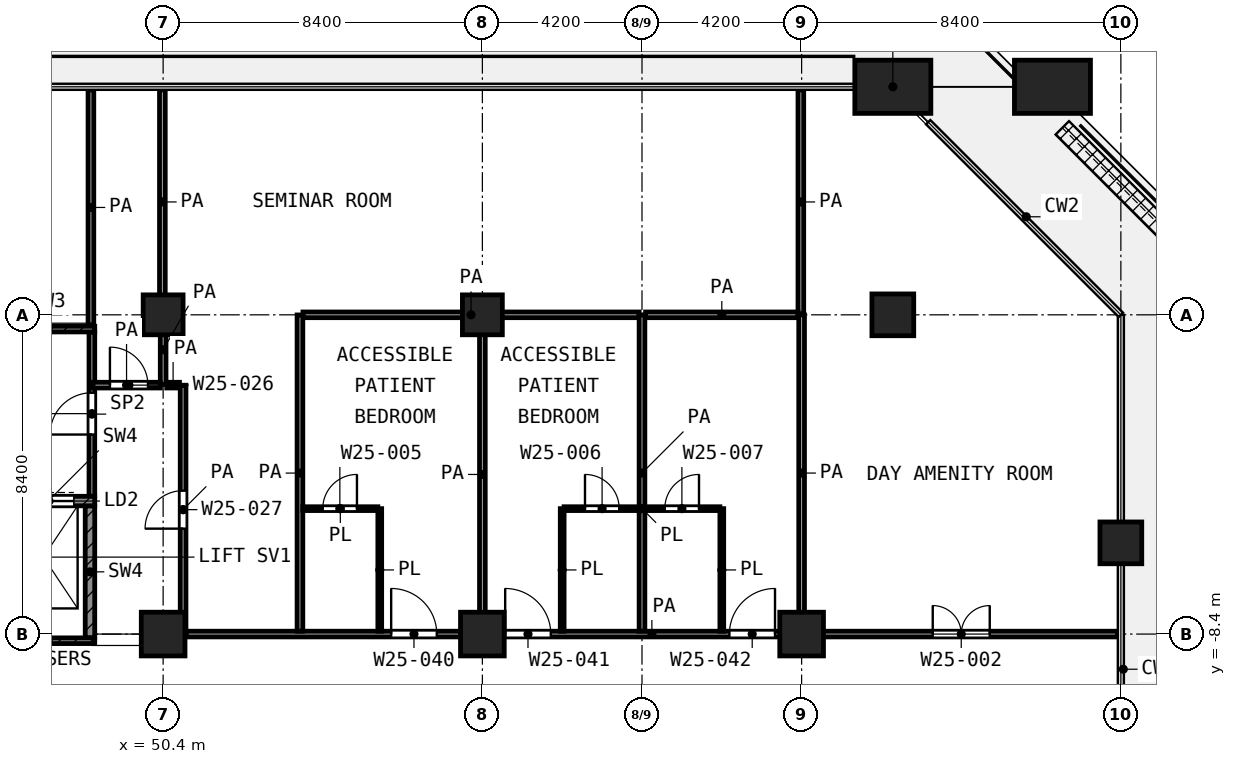
"""IFC4 building model, lengths in metres.
Left out: names, types, materials, properties, quantities, classifications, styles, units other than length and angle.
Written with IfcOpenShell. Run it as: python <this file> out.ifc"""

import sys

from ifc_helpers import new_model, si_unit, direction, frame, frame_2d, origin, origin_2d, place, context, subcontext, project, spatial, rectangle, extrude, element, fill, save


model = new_model("IFC4")
c1 = context("Model", 3, precision=1e-05, world=origin(), true_north=direction((0.0, 1.0)))
c2 = subcontext(c1, "Body", "Model", "MODEL_VIEW")
j1 = project(units=[si_unit("LENGTHUNIT", "METRE"), si_unit("PLANEANGLEUNIT", "RADIAN")], contexts=[c1])
p1 = place(None, origin())
s1 = spatial("IfcSite", under=j1, at=p1, CompositionType="ELEMENT")
p2 = place(p1, origin())
s2 = spatial("IfcBuilding", under=s1, at=p2, CompositionType="ELEMENT")
p3 = place(p2, frame((0.0, 0.0, 111.4)))
s3 = spatial("IfcBuildingStorey", under=s2, at=p3, CompositionType="ELEMENT", Elevation=111.4)
for number, where, z_axis, x_axis in (
    (1, (50.4, 0.0, 0.0), (0.0, 0.0, 1.0), (1.0, 0.0, 0.0)),
    (2, (58.8, 0.0, 0.0), (0.0, 0.0, 1.0), (1.0, 0.0, 0.0)),
):
    element("IfcColumn", number, at=place(p3, frame(where, z_axis=z_axis, x_axis=x_axis)), inside=s3, PredefinedType="COLUMN", context=c2, shape_type="SweptSolid", body=[
        extrude(rectangle(XDim=1.05, YDim=1.05, at=origin_2d()), origin(), (0.0, 0.0, 1.0), 4.2),
    ])
for number, where, z_axis, x_axis in (
    (3, (69.6, 0.0, 0.0), (0.0, 0.0, 1.0), (1.0, 0.0, 0.0)),
    (4, (75.6, -6.0, 0.0), (0.0, 0.0, 1.0), (1.0, 0.0, 0.0)),
):
    element("IfcColumn", number, at=place(p3, frame(where, z_axis=z_axis, x_axis=x_axis)), inside=s3, PredefinedType="COLUMN", context=c2, shape_type="SweptSolid", body=[
        extrude(rectangle(XDim=1.1, YDim=1.1, at=origin_2d()), origin(), (0.0, 0.0, 1.0), 4.2),
    ])
for number, where, z_axis, x_axis in (
    (5, (50.4, -8.4, 0.0), (0.0, 0.0, 1.0), (1.0, 0.0, 0.0)),
    (6, (58.8, -8.4, 0.0), (0.0, 0.0, 1.0), (1.0, 0.0, 0.0)),
    (7, (67.2, -8.4, 0.0), (0.0, 0.0, 1.0), (1.0, 0.0, 0.0)),
):
    element("IfcColumn", number, at=place(p3, frame(where, z_axis=z_axis, x_axis=x_axis)), inside=s3, PredefinedType="COLUMN", context=c2, shape_type="SweptSolid", body=[
        extrude(rectangle(XDim=1.15, YDim=1.15, at=origin_2d()), origin(), (0.0, 0.0, 1.0), 4.2),
    ])
for number, where, z_axis, x_axis in (
    (8, (69.6, 6.0, 0.0), (0.0, 0.0, 1.0), (1.0, 0.0, 0.0)),
    (9, (73.8, 6.0, 0.0), (0.0, 0.0, 1.0), (1.0, 0.0, 0.0)),
):
    element("IfcColumn", number, at=place(p3, frame(where, z_axis=z_axis, x_axis=x_axis)), inside=s3, PredefinedType="COLUMN", context=c2, shape_type="SweptSolid", body=[
        extrude(rectangle(XDim=2.0, YDim=1.4, at=origin_2d()), origin(), (0.0, 0.0, 1.0), 4.2),
    ])
for number, where, z_axis, x_axis in (
    (10, (46.15, -0.375, 0.0), (0.0, 0.0, 1.0), (1.0, 0.0, 0.0)),
    (11, (46.15, -8.575, 0.0), (0.0, 0.0, 1.0), (1.0, 0.0, 0.0)),
):
    element("IfcWall", number, at=place(p3, frame(where, z_axis=z_axis, x_axis=x_axis)), inside=s3, PredefinedType="SHEAR", context=c2, shape_type="SweptSolid", body=[
        extrude(rectangle(XDim=2.45, YDim=0.15, at=frame_2d((1.225, 0.0))), origin(), (0.0, 0.0, 1.0), 3.6),
    ])
p4 = place(p3, frame((46.15, -4.9, 0.0), z_axis=(0.0, 0.0, 1.0), x_axis=(1.0, 0.0, 0.0)))
e12 = element("IfcWall", 12, at=p4, inside=s3, PredefinedType="SHEAR", context=c2, shape_type="SweptSolid", body=[
    extrude(rectangle(XDim=2.45, YDim=0.25, at=frame_2d((1.225, 0.0))), origin(), (0.0, 0.0, 1.0), 3.6),
])
p5 = place(p4, frame((0.6, 0.0, 0.0)))
e13 = element("IfcOpeningElement", 13, at=p5, cuts=e12, PredefinedType="OPENING", context=c2, shape_type="SweptSolid", body=[
    extrude(rectangle(XDim=1.3, YDim=2.1, at=frame_2d((0.65, 1.05))), frame((0.0, 0.135, 0.0), z_axis=(0.0, -1.0, 0.0), x_axis=(1.0, 0.0, 0.0)), (0.0, 0.0, 1.0), 0.27),
])
p6 = place(p3, frame((48.475, -8.5, 0.0), z_axis=(0.0, 0.0, 1.0), x_axis=(0.0, 1.0, 0.0)))
e14 = element("IfcWall", 14, at=p6, inside=s3, PredefinedType="SHEAR", context=c2, shape_type="SweptSolid", body=[
    extrude(rectangle(XDim=3.475, YDim=0.25, at=frame_2d((1.738, 0.0))), origin(), (0.0, 0.0, 1.0), 3.6),
])
p7 = place(p3, frame((48.525, -4.775, 0.0), z_axis=(0.0, 0.0, 1.0), x_axis=(0.0, 1.0, 0.0)))
e15 = element("IfcWall", 15, at=p7, inside=s3, PredefinedType="PARTITIONING", context=c2, shape_type="SweptSolid", body=[
    extrude(rectangle(XDim=4.325, YDim=0.15, at=frame_2d((2.163, 0.0))), origin(), (0.0, 0.0, 1.0), 3.6),
])
p8 = place(p7, frame((1.625, 0.0, 0.0)))
e16 = element("IfcOpeningElement", 16, at=p8, cuts=e15, PredefinedType="OPENING", context=c2, shape_type="SweptSolid", body=[
    extrude(rectangle(XDim=1.1, YDim=2.1, at=frame_2d((0.55, 1.05))), frame((0.0, 0.085, 0.0), z_axis=(0.0, -1.0, 0.0), x_axis=(1.0, 0.0, 0.0)), (0.0, 0.0, 1.0), 0.17),
])
p9 = place(p3, frame((54.075, -5.1, 0.0), z_axis=(0.0, 0.0, 1.0), x_axis=(1.0, 0.0, 0.0)))
e17 = element("IfcWall", 17, at=p9, inside=s3, PredefinedType="PARTITIONING", context=c2, shape_type="SweptSolid", body=[
    extrude(rectangle(XDim=1.975, YDim=0.1, at=frame_2d((0.988, 0.0))), origin(), (0.0, 0.0, 1.0), 3.6),
])
p10 = place(p9, frame((0.525, 0.0, 0.0)))
e18 = element("IfcOpeningElement", 18, at=p10, cuts=e17, PredefinedType="OPENING", context=c2, shape_type="SweptSolid", body=[
    extrude(rectangle(XDim=0.9, YDim=2.1, at=frame_2d((0.45, 1.05))), frame((0.0, 0.06, 0.0), z_axis=(0.0, -1.0, 0.0), x_axis=(1.0, 0.0, 0.0)), (0.0, 0.0, 1.0), 0.12),
])
p11 = place(p3, frame((60.95, -5.1, 0.0), z_axis=(0.0, 0.0, 1.0), x_axis=(1.0, 0.0, 0.0)))
e19 = element("IfcWall", 19, at=p11, inside=s3, PredefinedType="PARTITIONING", context=c2, shape_type="SweptSolid", body=[
    extrude(rectangle(XDim=4.1, YDim=0.1, at=frame_2d((2.05, 0.0))), origin(), (0.0, 0.0, 1.0), 3.6),
])
p12 = place(p11, frame((0.55, 0.0, 0.0)))
e20 = element("IfcOpeningElement", 20, at=p12, cuts=e19, PredefinedType="OPENING", context=c2, shape_type="SweptSolid", body=[
    extrude(rectangle(XDim=0.9, YDim=2.1, at=frame_2d((0.45, 1.05))), frame((0.0, 0.06, 0.0), z_axis=(0.0, -1.0, 0.0), x_axis=(1.0, 0.0, 0.0)), (0.0, 0.0, 1.0), 0.12),
])
p13 = place(p11, frame((2.65, 0.0, 0.0)))
e21 = element("IfcOpeningElement", 21, at=p13, cuts=e19, PredefinedType="OPENING", context=c2, shape_type="SweptSolid", body=[
    extrude(rectangle(XDim=0.9, YDim=2.1, at=frame_2d((0.45, 1.05))), frame((0.0, 0.06, 0.0), z_axis=(0.0, -1.0, 0.0), x_axis=(1.0, 0.0, 0.0)), (0.0, 0.0, 1.0), 0.12),
])
for number, where, z_axis, x_axis in (
    (22, (56.1, -8.325, 0.0), (0.0, 0.0, 1.0), (0.0, 1.0, 0.0)),
    (23, (60.9, -8.325, 0.0), (0.0, 0.0, 1.0), (0.0, 1.0, 0.0)),
    (24, (65.1, -8.325, 0.0), (0.0, 0.0, 1.0), (0.0, 1.0, 0.0)),
):
    element("IfcWall", number, at=place(p3, frame(where, z_axis=z_axis, x_axis=x_axis)), inside=s3, PredefinedType="PARTITIONING", context=c2, shape_type="SweptSolid", body=[
        extrude(rectangle(XDim=3.225, YDim=0.1, at=frame_2d((1.612, 0.0))), origin(), (0.0, 0.0, 1.0), 3.6),
    ])
p14 = place(p3, frame((51.0, -8.4, 0.0), z_axis=(0.0, 0.0, 1.0), x_axis=(1.0, 0.0, 0.0)))
e25 = element("IfcWall", 25, at=p14, inside=s3, PredefinedType="PARTITIONING", context=c2, shape_type="SweptSolid", body=[
    extrude(rectangle(XDim=24.52, YDim=0.15, at=frame_2d((12.26, 0.0))), origin(), (0.0, 0.0, 1.0), 3.6),
])
p15 = place(p14, frame((5.4, 0.0, 0.0)))
e26 = element("IfcOpeningElement", 26, at=p15, cuts=e25, PredefinedType="OPENING", context=c2, shape_type="SweptSolid", body=[
    extrude(rectangle(XDim=1.2, YDim=2.1, at=frame_2d((0.6, 1.05))), frame((0.0, 0.085, 0.0), z_axis=(0.0, -1.0, 0.0), x_axis=(1.0, 0.0, 0.0)), (0.0, 0.0, 1.0), 0.17),
])
p16 = place(p14, frame((8.4, 0.0, 0.0)))
e27 = element("IfcOpeningElement", 27, at=p16, cuts=e25, PredefinedType="OPENING", context=c2, shape_type="SweptSolid", body=[
    extrude(rectangle(XDim=1.2, YDim=2.1, at=frame_2d((0.6, 1.05))), frame((0.0, 0.085, 0.0), z_axis=(0.0, -1.0, 0.0), x_axis=(1.0, 0.0, 0.0)), (0.0, 0.0, 1.0), 0.17),
])
p17 = place(p14, frame((14.3, 0.0, 0.0)))
e28 = element("IfcOpeningElement", 28, at=p17, cuts=e25, PredefinedType="OPENING", context=c2, shape_type="SweptSolid", body=[
    extrude(rectangle(XDim=1.2, YDim=2.1, at=frame_2d((0.6, 1.05))), frame((0.0, 0.085, 0.0), z_axis=(0.0, -1.0, 0.0), x_axis=(1.0, 0.0, 0.0)), (0.0, 0.0, 1.0), 0.17),
])
p18 = place(p14, frame((19.65, 0.0, 0.0)))
e29 = element("IfcOpeningElement", 29, at=p18, cuts=e25, PredefinedType="OPENING", context=c2, shape_type="SweptSolid", body=[
    extrude(rectangle(XDim=1.5, YDim=2.1, at=frame_2d((0.75, 1.05))), frame((0.0, 0.085, 0.0), z_axis=(0.0, -1.0, 0.0), x_axis=(1.0, 0.0, 0.0)), (0.0, 0.0, 1.0), 0.17),
])
p19 = place(p3, frame((48.55, -1.85, 0.0), z_axis=(0.0, 0.0, 1.0), x_axis=(1.0, 0.0, 0.0)))
e30 = element("IfcWall", 30, at=p19, inside=s3, PredefinedType="PARTITIONING", context=c2, shape_type="SweptSolid", body=[
    extrude(rectangle(XDim=1.775, YDim=0.15, at=frame_2d((0.887, 0.0))), origin(), (0.0, 0.0, 1.0), 3.6),
])
p20 = place(p19, frame((0.45, 0.0, 0.0)))
e31 = element("IfcOpeningElement", 31, at=p20, cuts=e30, PredefinedType="OPENING", context=c2, shape_type="SweptSolid", body=[
    extrude(rectangle(XDim=1.0, YDim=2.1, at=frame_2d((0.5, 1.05))), frame((0.0, 0.085, 0.0), z_axis=(0.0, -1.0, 0.0), x_axis=(1.0, 0.0, 0.0)), (0.0, 0.0, 1.0), 0.17),
])
p21 = place(p3, frame((50.495, -1.85, 0.0), z_axis=(0.0, 0.0, 1.0), x_axis=(1.0, 0.0, 0.0)))
e32 = element("IfcWall", 32, at=p21, inside=s3, PredefinedType="PARTITIONING", context=c2, shape_type="SweptSolid", body=[
    extrude(rectangle(XDim=0.335, YDim=0.15, at=frame_2d((0.167, 0.0))), origin(), (0.0, 0.0, 1.0), 3.6),
])
p22 = place(p3, frame((54.079, 0.0, 0.0), z_axis=(0.0, 0.0, 1.0), x_axis=(1.0, 0.0, 0.0)))
e33 = element("IfcWall", 33, at=p22, inside=s3, PredefinedType="PARTITIONING", context=c2, shape_type="SweptSolid", body=[
    extrude(rectangle(XDim=8.846, YDim=0.15, at=frame_2d((4.423, 0.0))), origin(), (0.0, 0.0, 1.0), 3.6),
])
p23 = place(p3, frame((63.095, 0.0, 0.0), z_axis=(0.0, 0.0, 1.0), x_axis=(1.0, 0.0, 0.0)))
e34 = element("IfcWall", 34, at=p23, inside=s3, PredefinedType="PARTITIONING", context=c2, shape_type="SweptSolid", body=[
    extrude(rectangle(XDim=4.01, YDim=0.15, at=frame_2d((2.005, 0.0))), origin(), (0.0, 0.0, 1.0), 3.6),
])
p24 = place(p3, frame((48.5, -0.27, 0.0), z_axis=(0.0, 0.0, 1.0), x_axis=(0.0, 1.0, 0.0)))
e35 = element("IfcWall", 35, at=p24, inside=s3, PredefinedType="PARTITIONING", context=c2, shape_type="SweptSolid", body=[
    extrude(rectangle(XDim=6.19, YDim=0.15, at=frame_2d((3.095, 0.0))), origin(), (0.0, 0.0, 1.0), 3.6),
])
p25 = place(p3, frame((50.38, 0.02, 0.0), z_axis=(0.0, 0.0, 1.0), x_axis=(0.0, 1.0, 0.0)))
e36 = element("IfcWall", 36, at=p25, inside=s3, PredefinedType="PARTITIONING", context=c2, shape_type="SweptSolid", body=[
    extrude(rectangle(XDim=5.9, YDim=0.15, at=frame_2d((2.95, 0.0))), origin(), (0.0, 0.0, 1.0), 3.6),
])
p26 = place(p3, frame((50.4, -1.83, 0.0), z_axis=(0.0, 0.0, 1.0), x_axis=(0.0, 1.0, 0.0)))
e37 = element("IfcWall", 37, at=p26, inside=s3, PredefinedType="PARTITIONING", context=c2, shape_type="SweptSolid", body=[
    extrude(rectangle(XDim=1.825, YDim=0.15, at=frame_2d((0.913, 0.0))), origin(), (0.0, 0.0, 1.0), 3.6),
])
p27 = place(p3, frame((50.925, -8.4, 0.0), z_axis=(0.0, 0.0, 1.0), x_axis=(0.0, 1.0, 0.0)))
e38 = element("IfcWall", 38, at=p27, inside=s3, PredefinedType="PARTITIONING", context=c2, shape_type="SweptSolid", body=[
    extrude(rectangle(XDim=6.548, YDim=0.15, at=frame_2d((3.274, 0.0))), origin(), (0.0, 0.0, 1.0), 3.6),
])
p28 = place(p27, frame((2.774, 0.0, 0.0)))
e39 = element("IfcOpeningElement", 39, at=p28, cuts=e38, PredefinedType="OPENING", context=c2, shape_type="SweptSolid", body=[
    extrude(rectangle(XDim=1.0, YDim=2.1, at=frame_2d((0.5, 1.05))), frame((0.0, 0.085, 0.0), z_axis=(0.0, -1.0, 0.0), x_axis=(1.0, 0.0, 0.0)), (0.0, 0.0, 1.0), 0.17),
])
p29 = place(p3, frame((54.0, -8.325, 0.0), z_axis=(0.0, 0.0, 1.0), x_axis=(0.0, 1.0, 0.0)))
e40 = element("IfcWall", 40, at=p29, inside=s3, PredefinedType="PARTITIONING", context=c2, shape_type="SweptSolid", body=[
    extrude(rectangle(XDim=8.322, YDim=0.15, at=frame_2d((4.161, 0.0))), origin(), (0.0, 0.0, 1.0), 3.6),
])
p30 = place(p3, frame((58.8, -8.325, 0.0), z_axis=(0.0, 0.0, 1.0), x_axis=(0.0, 1.0, 0.0)))
e41 = element("IfcWall", 41, at=p30, inside=s3, PredefinedType="PARTITIONING", context=c2, shape_type="SweptSolid", body=[
    extrude(rectangle(XDim=8.25, YDim=0.15, at=frame_2d((4.125, 0.0))), origin(), (0.0, 0.0, 1.0), 3.6),
])
p31 = place(p3, frame((63.0, -8.325, 0.0), z_axis=(0.0, 0.0, 1.0), x_axis=(0.0, 1.0, 0.0)))
e42 = element("IfcWall", 42, at=p31, inside=s3, PredefinedType="PARTITIONING", context=c2, shape_type="SweptSolid", body=[
    extrude(rectangle(XDim=8.325, YDim=0.15, at=frame_2d((4.163, 0.0))), origin(), (0.0, 0.0, 1.0), 3.6),
])
p32 = place(p3, frame((67.18, 0.02, 0.0), z_axis=(0.0, 0.0, 1.0), x_axis=(0.0, 1.0, 0.0)))
e43 = element("IfcWall", 43, at=p32, inside=s3, PredefinedType="PARTITIONING", context=c2, shape_type="SweptSolid", body=[
    extrude(rectangle(XDim=5.9, YDim=0.15, at=frame_2d((2.95, 0.0))), origin(), (0.0, 0.0, 1.0), 3.6),
])
p33 = place(p3, frame((67.2, -8.325, 0.0), z_axis=(0.0, 0.0, 1.0), x_axis=(0.0, 1.0, 0.0)))
e44 = element("IfcWall", 44, at=p33, inside=s3, PredefinedType="PARTITIONING", context=c2, shape_type="SweptSolid", body=[
    extrude(rectangle(XDim=8.323, YDim=0.15, at=frame_2d((4.162, 0.0))), origin(), (0.0, 0.0, 1.0), 3.6),
])
p34 = place(p5, origin())
e45 = element("IfcDoor", 45, at=p34, inside=s3, OperationType="DOUBLE_DOOR_SLIDING", PredefinedType="DOOR", context=c2, shape_type="SweptSolid", body=[
    extrude(rectangle(XDim=1.3, YDim=2.1, at=frame_2d((0.65, 1.05))), frame((0.0, 0.025, 0.0), z_axis=(0.0, -1.0, 0.0), x_axis=(1.0, 0.0, 0.0)), (0.0, 0.0, 1.0), 0.05),
])
fill(e13, e45)
p35 = place(p8, origin())
e46 = element("IfcDoor", 46, at=p35, inside=s3, OperationType="SINGLE_SWING_LEFT", PredefinedType="DOOR", context=c2, shape_type="SweptSolid", body=[
    extrude(rectangle(XDim=1.1, YDim=2.1, at=frame_2d((0.55, 1.05))), frame((0.0, 0.025, 0.0), z_axis=(0.0, -1.0, 0.0), x_axis=(1.0, 0.0, 0.0)), (0.0, 0.0, 1.0), 0.05),
])
fill(e16, e46)
p36 = place(p20, origin())
e47 = element("IfcDoor", 47, at=p36, inside=s3, OperationType="SINGLE_SWING_LEFT", PredefinedType="DOOR", context=c2, shape_type="SweptSolid", body=[
    extrude(rectangle(XDim=1.0, YDim=2.1, at=frame_2d((0.5, 1.05))), frame((0.0, 0.025, 0.0), z_axis=(0.0, -1.0, 0.0), x_axis=(1.0, 0.0, 0.0)), (0.0, 0.0, 1.0), 0.05),
])
fill(e31, e47)
p37 = place(p28, origin())
e48 = element("IfcDoor", 48, at=p37, inside=s3, OperationType="SINGLE_SWING_LEFT", PredefinedType="DOOR", context=c2, shape_type="SweptSolid", body=[
    extrude(rectangle(XDim=1.0, YDim=2.1, at=frame_2d((0.5, 1.05))), frame((0.0, 0.025, 0.0), z_axis=(0.0, -1.0, 0.0), x_axis=(1.0, 0.0, 0.0)), (0.0, 0.0, 1.0), 0.05),
])
fill(e39, e48)
p38 = place(p15, origin())
e49 = element("IfcDoor", 49, at=p38, inside=s3, OperationType="SINGLE_SWING_LEFT", PredefinedType="DOOR", context=c2, shape_type="SweptSolid", body=[
    extrude(rectangle(XDim=1.2, YDim=2.1, at=frame_2d((0.6, 1.05))), frame((0.0, 0.025, 0.0), z_axis=(0.0, -1.0, 0.0), x_axis=(1.0, 0.0, 0.0)), (0.0, 0.0, 1.0), 0.05),
])
fill(e26, e49)
p39 = place(p10, origin())
e50 = element("IfcDoor", 50, at=p39, inside=s3, OperationType="SINGLE_SWING_RIGHT", PredefinedType="DOOR", context=c2, shape_type="SweptSolid", body=[
    extrude(rectangle(XDim=0.9, YDim=2.1, at=frame_2d((0.45, 1.05))), frame((0.0, 0.025, 0.0), z_axis=(0.0, -1.0, 0.0), x_axis=(1.0, 0.0, 0.0)), (0.0, 0.0, 1.0), 0.05),
])
fill(e18, e50)
p40 = place(p16, origin())
e51 = element("IfcDoor", 51, at=p40, inside=s3, OperationType="SINGLE_SWING_LEFT", PredefinedType="DOOR", context=c2, shape_type="SweptSolid", body=[
    extrude(rectangle(XDim=1.2, YDim=2.1, at=frame_2d((0.6, 1.05))), frame((0.0, 0.025, 0.0), z_axis=(0.0, -1.0, 0.0), x_axis=(1.0, 0.0, 0.0)), (0.0, 0.0, 1.0), 0.05),
])
fill(e27, e51)
p41 = place(p12, origin())
e52 = element("IfcDoor", 52, at=p41, inside=s3, OperationType="SINGLE_SWING_LEFT", PredefinedType="DOOR", context=c2, shape_type="SweptSolid", body=[
    extrude(rectangle(XDim=0.9, YDim=2.1, at=frame_2d((0.45, 1.05))), frame((0.0, 0.025, 0.0), z_axis=(0.0, -1.0, 0.0), x_axis=(1.0, 0.0, 0.0)), (0.0, 0.0, 1.0), 0.05),
])
fill(e20, e52)
p42 = place(p17, origin())
e53 = element("IfcDoor", 53, at=p42, inside=s3, OperationType="SINGLE_SWING_RIGHT", PredefinedType="DOOR", context=c2, shape_type="SweptSolid", body=[
    extrude(rectangle(XDim=1.2, YDim=2.1, at=frame_2d((0.6, 1.05))), frame((0.0, 0.025, 0.0), z_axis=(0.0, -1.0, 0.0), x_axis=(1.0, 0.0, 0.0)), (0.0, 0.0, 1.0), 0.05),
])
fill(e28, e53)
p43 = place(p13, origin())
e54 = element("IfcDoor", 54, at=p43, inside=s3, OperationType="SINGLE_SWING_RIGHT", PredefinedType="DOOR", context=c2, shape_type="SweptSolid", body=[
    extrude(rectangle(XDim=0.9, YDim=2.1, at=frame_2d((0.45, 1.05))), frame((0.0, 0.025, 0.0), z_axis=(0.0, -1.0, 0.0), x_axis=(1.0, 0.0, 0.0)), (0.0, 0.0, 1.0), 0.05),
])
fill(e21, e54)
p44 = place(p18, origin())
e55 = element("IfcDoor", 55, at=p44, inside=s3, OperationType="DOUBLE_DOOR_SINGLE_SWING", PredefinedType="DOOR", context=c2, shape_type="SweptSolid", body=[
    extrude(rectangle(XDim=1.5, YDim=2.1, at=frame_2d((0.75, 1.05))), frame((0.0, 0.025, 0.0), z_axis=(0.0, -1.0, 0.0), x_axis=(1.0, 0.0, 0.0)), (0.0, 0.0, 1.0), 0.05),
])
fill(e29, e55)
save(model, sys.argv[1])
